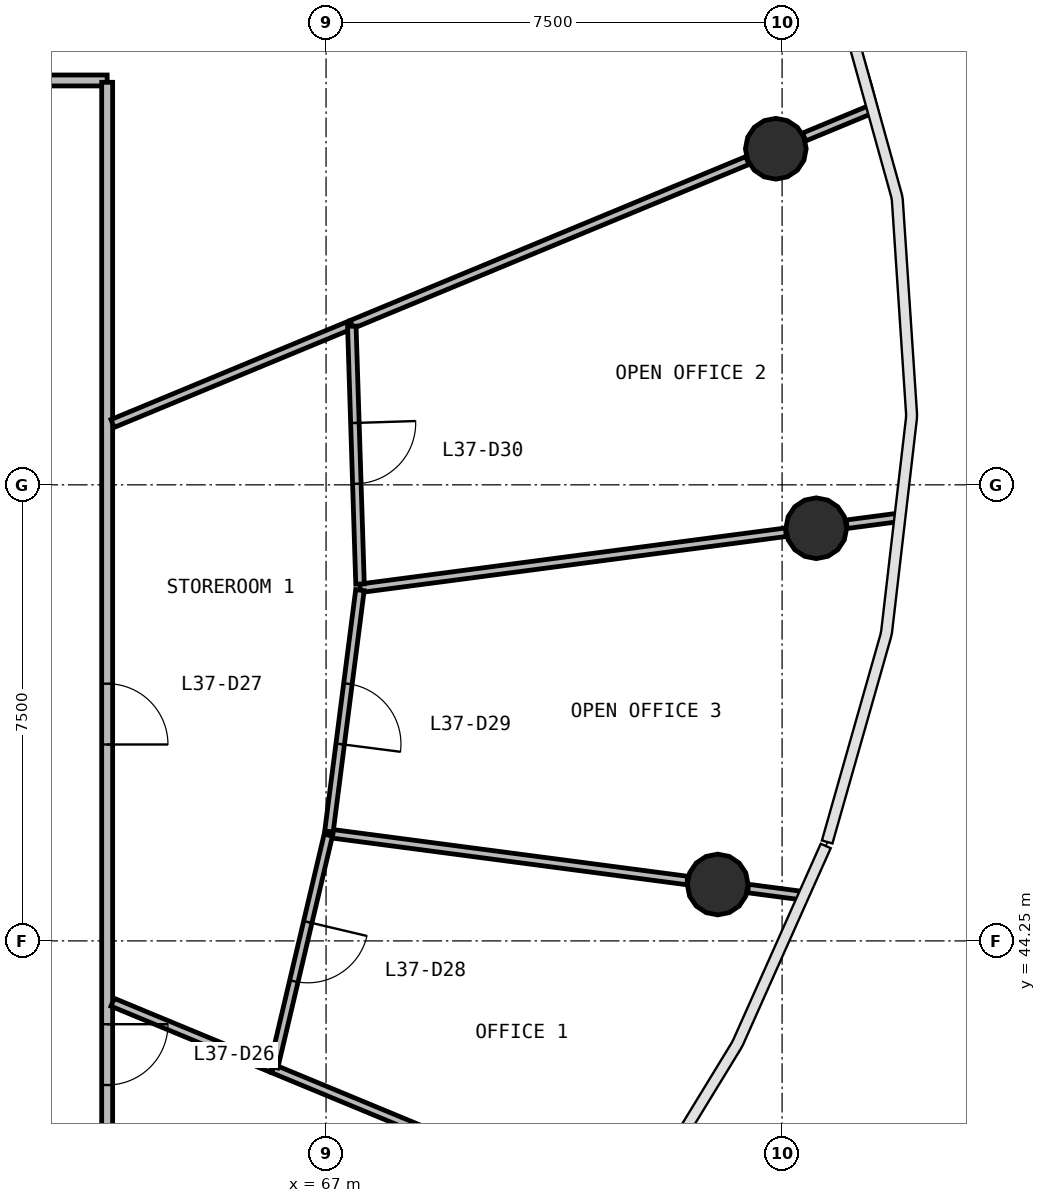
"""IFC4 building model, lengths in metres.
Left out: names, types, materials, properties, quantities, classifications, styles, units other than length and angle.
Written with IfcOpenShell. Run it as: python <this file> out.ifc"""

import sys

from ifc_helpers import new_model, si_unit, direction, frame, frame_2d, origin, origin_2d, place, context, subcontext, project, spatial, rectangle, circle, extrude, source, transform, mapped, element, fill, save


model = new_model("IFC4")
c1 = context("Model", 3, precision=1e-05, world=origin(), true_north=direction((0.0, 1.0)))
c2 = subcontext(c1, "Body", "Model", "MODEL_VIEW")
j1 = project(units=[si_unit("LENGTHUNIT", "METRE"), si_unit("PLANEANGLEUNIT", "RADIAN")], contexts=[c1])
p1 = place(None, origin())
s1 = spatial("IfcSite", under=j1, at=p1, CompositionType="ELEMENT")
p2 = place(p1, origin())
s2 = spatial("IfcBuilding", under=s1, at=p2, CompositionType="ELEMENT")
p3 = place(p2, frame((0.0, 0.0, 156.5)))
s3 = spatial("IfcBuildingStorey", under=s2, at=p3, CompositionType="ELEMENT", Elevation=156.5)
m1 = source(origin(), c2, "Body", "SweptSolid", [
    extrude(circle(Radius=0.5, at=origin_2d()), origin(), (0.0, 0.0, 1.0), 3.9),
])
for number, where, z_axis, x_axis in (
    (1, (75.062, 51.036, 0.0), (0.0, 0.0, 1.0), (1.0, 0.0, 0.0)),
    (2, (74.397, 57.277, 0.0), (0.0, 0.0, 1.0), (1.0, 0.0, 0.0)),
    (3, (73.441, 45.177, 0.0), (0.0, 0.0, 1.0), (1.0, 0.0, 0.0)),
):
    element("IfcColumn", number, at=place(p3, frame(where, z_axis=z_axis, x_axis=x_axis)), inside=s3, PredefinedType="COLUMN", context=c2, shape_type="MappedRepresentation", body=[
        mapped(m1, transform((0.0, 0.0, 0.0), scale=1.0)),
    ])
p4 = place(p3, frame((40.6, 58.4, 0.0), z_axis=(0.0, 0.0, 1.0), x_axis=(1.0, 0.0, 0.0)))
e4 = element("IfcWall", 4, at=p4, inside=s3, PredefinedType="PARTITIONING", context=c2, shape_type="SweptSolid", body=[
    extrude(rectangle(XDim=22.8, YDim=0.18, at=frame_2d((11.4, 0.0))), origin(), (0.0, 0.0, 1.0), 2.88),
])
p5 = place(p4, frame((12.95, 0.0, 0.0)))
e5 = element("IfcOpeningElement", 5, at=p5, cuts=e4, PredefinedType="OPENING", context=c2, shape_type="SweptSolid", body=[
    extrude(rectangle(XDim=1.0, YDim=2.1, at=frame_2d((0.5, 1.05))), frame((0.0, 0.1, 0.0), z_axis=(0.0, -1.0, 0.0), x_axis=(1.0, 0.0, 0.0)), (0.0, 0.0, 1.0), 0.2),
])
p6 = place(p4, frame((10.95, 0.0, 0.0)))
e6 = element("IfcOpeningElement", 6, at=p6, cuts=e4, PredefinedType="OPENING", context=c2, shape_type="SweptSolid", body=[
    extrude(rectangle(XDim=1.0, YDim=2.1, at=frame_2d((0.5, 1.05))), frame((0.0, 0.1, 0.0), z_axis=(0.0, -1.0, 0.0), x_axis=(1.0, 0.0, 0.0)), (0.0, 0.0, 1.0), 0.2),
])
p7 = place(p3, frame((63.4, 58.37, 0.0), z_axis=(0.0, 0.0, 1.0), x_axis=(0.0, -1.0, 0.0)))
e7 = element("IfcWall", 7, at=p7, inside=s3, PredefinedType="PARTITIONING", context=c2, shape_type="SweptSolid", body=[
    extrude(rectangle(XDim=20.74, YDim=0.18, at=frame_2d((10.37, 0.0))), origin(), (0.0, 0.0, 1.0), 2.88),
])
p8 = place(p7, frame((15.49, 0.0, 0.0)))
e8 = element("IfcOpeningElement", 8, at=p8, cuts=e7, PredefinedType="OPENING", context=c2, shape_type="SweptSolid", body=[
    extrude(rectangle(XDim=1.0, YDim=2.1, at=frame_2d((0.5, 1.05))), frame((0.0, 0.1, 0.0), z_axis=(0.0, -1.0, 0.0), x_axis=(1.0, 0.0, 0.0)), (0.0, 0.0, 1.0), 0.2),
])
p9 = place(p7, frame((9.89, 0.0, 0.0)))
e9 = element("IfcOpeningElement", 9, at=p9, cuts=e7, PredefinedType="OPENING", context=c2, shape_type="SweptSolid", body=[
    extrude(rectangle(XDim=1.0, YDim=2.1, at=frame_2d((0.5, 1.05))), frame((0.0, 0.1, 0.0), z_axis=(0.0, -1.0, 0.0), x_axis=(1.0, 0.0, 0.0)), (0.0, 0.0, 1.0), 0.2),
])
p10 = place(p3, frame((67.561, 50.049, 0.0), z_axis=(0.0, 0.0, 1.0), x_axis=(0.991446056041, 0.130517117504, 0.0)))
e10 = element("IfcWall", 10, at=p10, inside=s3, PredefinedType="PARTITIONING", context=c2, shape_type="SweptSolid", body=[
    extrude(rectangle(XDim=7.061, YDim=0.14, at=frame_2d((3.531, 0.0))), origin(), (0.0, 0.0, 1.0), 2.88),
])
p11 = place(p3, frame((67.423, 54.388, 0.0), z_axis=(0.0, 0.0, 1.0), x_axis=(0.923877847589, 0.382687500102, 0.0)))
e11 = element("IfcWall", 11, at=p11, inside=s3, PredefinedType="PARTITIONING", context=c2, shape_type="SweptSolid", body=[
    extrude(rectangle(XDim=7.044, YDim=0.14, at=frame_2d((3.522, 0.0))), origin(), (0.0, 0.0, 1.0), 2.88),
])
p12 = place(p3, frame((67.044, 46.019, 0.0), z_axis=(0.0, 0.0, 1.0), x_axis=(0.991450523091, -0.13048318, 0.0)))
e12 = element("IfcWall", 12, at=p12, inside=s3, PredefinedType="PARTITIONING", context=c2, shape_type="SweptSolid", body=[
    extrude(rectangle(XDim=5.948, YDim=0.14, at=frame_2d((2.974, 0.0))), origin(), (0.0, 0.0, 1.0), 2.88),
])
p13 = place(p3, frame((66.131, 42.147, 0.0), z_axis=(0.0, 0.0, 1.0), x_axis=(0.923872072557, -0.382701441792, 0.0)))
e13 = element("IfcWall", 13, at=p13, inside=s3, PredefinedType="PARTITIONING", context=c2, shape_type="SweptSolid", body=[
    extrude(rectangle(XDim=4.44, YDim=0.14, at=frame_2d((2.22, 0.0))), origin(), (0.0, 0.0, 1.0), 2.88),
])
p14 = place(p3, frame((63.49, 52.759, 0.0), z_axis=(0.0, 0.0, 1.0), x_axis=(0.923878137975, 0.382686799055, 0.0)))
e14 = element("IfcWall", 14, at=p14, inside=s3, PredefinedType="PARTITIONING", context=c2, shape_type="SweptSolid", body=[
    extrude(rectangle(XDim=4.227, YDim=0.14, at=frame_2d((2.113, 0.0))), origin(), (0.0, 0.0, 1.0), 2.88),
])
p15 = place(p3, frame((67.424, 54.358, 0.0), z_axis=(0.0, 0.0, 1.0), x_axis=(0.031887030208, -0.999491479356, 0.0)))
e15 = element("IfcWall", 15, at=p15, inside=s3, PredefinedType="PARTITIONING", context=c2, shape_type="SweptSolid", body=[
    extrude(rectangle(XDim=4.242, YDim=0.14, at=frame_2d((2.121, 0.0))), origin(), (0.0, 0.0, 1.0), 2.88),
])
p16 = place(p15, frame((1.592, 0.0, 0.0)))
e16 = element("IfcOpeningElement", 16, at=p16, cuts=e15, PredefinedType="OPENING", context=c2, shape_type="SweptSolid", body=[
    extrude(rectangle(XDim=1.0, YDim=2.1, at=frame_2d((0.5, 1.05))), frame((0.0, 0.08, 0.0), z_axis=(0.0, -1.0, 0.0), x_axis=(1.0, 0.0, 0.0)), (0.0, 0.0, 1.0), 0.16),
])
p17 = place(p3, frame((67.557, 50.019, 0.0), z_axis=(0.0, 0.0, 1.0), x_axis=(-0.127375141881, -0.99185461295, 0.0)))
e17 = element("IfcWall", 17, at=p17, inside=s3, PredefinedType="PARTITIONING", context=c2, shape_type="SweptSolid", body=[
    extrude(rectangle(XDim=4.002, YDim=0.14, at=frame_2d((2.001, 0.0))), origin(), (0.0, 0.0, 1.0), 2.88),
])
p18 = place(p17, frame((1.552, 0.0, 0.0)))
e18 = element("IfcOpeningElement", 18, at=p18, cuts=e17, PredefinedType="OPENING", context=c2, shape_type="SweptSolid", body=[
    extrude(rectangle(XDim=1.0, YDim=2.1, at=frame_2d((0.5, 1.05))), frame((0.0, 0.08, 0.0), z_axis=(0.0, -1.0, 0.0), x_axis=(1.0, 0.0, 0.0)), (0.0, 0.0, 1.0), 0.16),
])
p19 = place(p3, frame((67.037, 45.99, 0.0), z_axis=(0.0, 0.0, 1.0), x_axis=(-0.229452538662, -0.973319851077, 0.0)))
e19 = element("IfcWall", 19, at=p19, inside=s3, PredefinedType="PARTITIONING", context=c2, shape_type="SweptSolid", body=[
    extrude(rectangle(XDim=3.919, YDim=0.14, at=frame_2d((1.959, 0.0))), origin(), (0.0, 0.0, 1.0), 2.88),
])
p20 = place(p19, frame((1.469, 0.0, 0.0)))
e20 = element("IfcOpeningElement", 20, at=p20, cuts=e19, PredefinedType="OPENING", context=c2, shape_type="SweptSolid", body=[
    extrude(rectangle(XDim=1.0, YDim=2.1, at=frame_2d((0.5, 1.05))), frame((0.0, 0.08, 0.0), z_axis=(0.0, -1.0, 0.0), x_axis=(1.0, 0.0, 0.0)), (0.0, 0.0, 1.0), 0.16),
])
p21 = place(p3, frame((63.49, 43.241, 0.0), z_axis=(0.0, 0.0, 1.0), x_axis=(0.923859015747, -0.382732960462, 0.0)))
e21 = element("IfcWall", 21, at=p21, inside=s3, PredefinedType="PARTITIONING", context=c2, shape_type="SweptSolid", body=[
    extrude(rectangle(XDim=2.828, YDim=0.14, at=frame_2d((1.414, 0.0))), origin(), (0.0, 0.0, 1.0), 2.88),
])
p22 = place(p3, frame((74.863, 57.47, 0.0), z_axis=(0.0, 0.0, 1.0), x_axis=(0.923882723383, 0.382675728829, 0.0)))
e22 = element("IfcWall", 22, at=p22, inside=s3, PredefinedType="PARTITIONING", context=c2, shape_type="SweptSolid", body=[
    extrude(rectangle(XDim=1.198, YDim=0.14, at=frame_2d((0.599, 0.0))), origin(), (0.0, 0.0, 1.0), 2.88),
])
p23 = place(p3, frame((73.941, 45.111, 0.0), z_axis=(0.0, 0.0, 1.0), x_axis=(0.991446500326, -0.130513742537, 0.0)))
e23 = element("IfcWall", 23, at=p23, inside=s3, PredefinedType="PARTITIONING", context=c2, shape_type="SweptSolid", body=[
    extrude(rectangle(XDim=0.853, YDim=0.14, at=frame_2d((0.427, 0.0))), origin(), (0.0, 0.0, 1.0), 2.88),
])
p24 = place(p3, frame((75.562, 51.102, 0.0), z_axis=(0.0, 0.0, 1.0), x_axis=(0.991432738393, 0.130618242377, 0.0)))
e24 = element("IfcWall", 24, at=p24, inside=s3, PredefinedType="PARTITIONING", context=c2, shape_type="SweptSolid", body=[
    extrude(rectangle(XDim=0.849, YDim=0.14, at=frame_2d((0.424, 0.0))), origin(), (0.0, 0.0, 1.0), 2.88),
])
m2 = source(origin(), c2, "Body", "SweptSolid", [
    extrude(rectangle(XDim=1.0, YDim=2.1, at=frame_2d((0.5, 1.05))), frame((0.0, 0.025, 0.0), z_axis=(0.0, -1.0, 0.0), x_axis=(1.0, 0.0, 0.0)), (0.0, 0.0, 1.0), 0.05),
])
p25 = place(p8, origin())
e25 = element("IfcDoor", 25, at=p25, inside=s3, OperationType="SINGLE_SWING_LEFT", PredefinedType="DOOR", context=c2, shape_type="MappedRepresentation", body=[
    mapped(m2, transform((0.0, 0.0, 0.0), scale=1.0)),
])
fill(e8, e25)
p26 = place(p9, origin())
e26 = element("IfcDoor", 26, at=p26, inside=s3, OperationType="SINGLE_SWING_RIGHT", PredefinedType="DOOR", context=c2, shape_type="MappedRepresentation", body=[
    mapped(m2, transform((0.0, 0.0, 0.0), scale=1.0)),
])
fill(e9, e26)
p27 = place(p20, origin())
e27 = element("IfcDoor", 27, at=p27, inside=s3, OperationType="SINGLE_SWING_LEFT", PredefinedType="DOOR", context=c2, shape_type="MappedRepresentation", body=[
    mapped(m2, transform((0.0, 0.0, 0.0), scale=1.0)),
])
fill(e20, e27)
p28 = place(p18, origin())
e28 = element("IfcDoor", 28, at=p28, inside=s3, OperationType="SINGLE_SWING_RIGHT", PredefinedType="DOOR", context=c2, shape_type="MappedRepresentation", body=[
    mapped(m2, transform((0.0, 0.0, 0.0), scale=1.0)),
])
fill(e18, e28)
p29 = place(p16, origin())
e29 = element("IfcDoor", 29, at=p29, inside=s3, OperationType="SINGLE_SWING_LEFT", PredefinedType="DOOR", context=c2, shape_type="MappedRepresentation", body=[
    mapped(m2, transform((0.0, 0.0, 0.0), scale=1.0)),
])
fill(e16, e29)
save(model, sys.argv[1])
